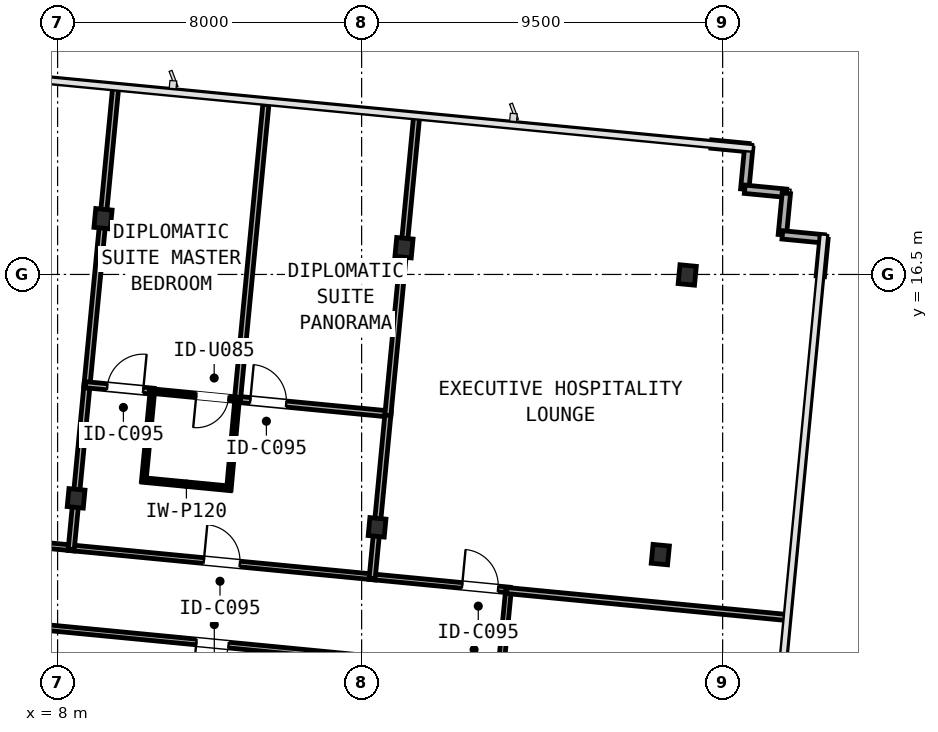
"""IFC4 building model, lengths in metres.
Left out: names, types, materials, properties, quantities, classifications, styles, units other than length and angle.
Written with IfcOpenShell. Run it as: python <this file> out.ifc"""

import sys

from ifc_helpers import new_model, si_unit, direction, frame, frame_2d, origin, origin_2d, place, context, subcontext, project, spatial, rectangle, i_section, extrude, element, fill, save


model = new_model("IFC4")
c1 = context("Model", 3, precision=1e-05, world=origin(), true_north=direction((0.0, 1.0)))
c2 = subcontext(c1, "Body", "Model", "MODEL_VIEW")
j1 = project(units=[si_unit("LENGTHUNIT", "METRE"), si_unit("PLANEANGLEUNIT", "RADIAN")], contexts=[c1])
p1 = place(None, origin())
s1 = spatial("IfcSite", under=j1, at=p1, CompositionType="ELEMENT")
p2 = place(p1, origin())
s2 = spatial("IfcBuilding", under=s1, at=p2, CompositionType="ELEMENT")
p3 = place(p2, frame((0.0, 0.0, 166.95)))
s3 = spatial("IfcBuildingStorey", under=s2, at=p3, CompositionType="ELEMENT", Elevation=166.95)
p4 = place(p3, frame((8.487, 10.609, 0.0), z_axis=(0.0, 0.0, 1.0), x_axis=(0.995396198367, -0.09584575252, 0.0)))
e1 = element("IfcColumn", 1, at=p4, inside=s3, PredefinedType="COLUMN", context=c2, shape_type="SweptSolid", body=[
    extrude(i_section(OverallWidth=0.424, OverallDepth=0.474, WebThickness=0.048, FlangeThickness=0.077, FilletRadius=0.031, at=origin_2d()), origin(), (0.0, 0.0, 1.0), 3.45),
])
p5 = place(p3, frame((9.195, 17.967, 0.0), z_axis=(0.0, 0.0, 1.0), x_axis=(0.995396198367, -0.09584575252, 0.0)))
e2 = element("IfcColumn", 2, at=p5, inside=s3, PredefinedType="COLUMN", context=c2, shape_type="SweptSolid", body=[
    extrude(i_section(OverallWidth=0.432, OverallDepth=0.498, WebThickness=0.056, FlangeThickness=0.089, FilletRadius=0.031, at=origin_2d()), origin(), (0.0, 0.0, 1.0), 3.45),
])
p6 = place(p3, frame((16.406, 9.846, 0.0), z_axis=(0.0, 0.0, 1.0), x_axis=(0.995396198367, -0.09584575252, 0.0)))
e3 = element("IfcColumn", 3, at=p6, inside=s3, PredefinedType="COLUMN", context=c2, shape_type="SweptSolid", body=[
    extrude(i_section(OverallWidth=0.424, OverallDepth=0.474, WebThickness=0.048, FlangeThickness=0.077, FilletRadius=0.031, at=origin_2d()), origin(), (0.0, 0.0, 1.0), 3.45),
])
for number, where, z_axis, x_axis in (
    (4, (17.115, 17.204, 0.0), (0.0, 0.0, 1.0), (0.995, -0.096, 0.0)),
    (5, (23.86, 9.128, 0.0), (0.0, 0.0, 1.0), (0.995, -0.096, 0.0)),
    (6, (24.568, 16.486, 0.0), (0.0, 0.0, 1.0), (0.995, -0.096, 0.0)),
):
    element("IfcColumn", number, at=place(p3, frame(where, z_axis=z_axis, x_axis=x_axis)), inside=s3, PredefinedType="COLUMN", context=c2, shape_type="SweptSolid", body=[
        extrude(i_section(OverallWidth=0.432, OverallDepth=0.498, WebThickness=0.056, FlangeThickness=0.089, FilletRadius=0.031, at=origin_2d()), origin(), (0.0, 0.0, 1.0), 3.45),
    ])
p7 = place(p3, frame((25.201, 19.931, 0.0), z_axis=(0.0, 0.0, 1.0), x_axis=(0.99541083642, -0.095693608655, 0.0)))
e7 = element("IfcWall", 7, at=p7, inside=s3, PredefinedType="STANDARD", context=c2, shape_type="SweptSolid", body=[
    extrude(rectangle(XDim=0.99, YDim=0.22, at=frame_2d((0.495, 0.0))), origin(), (0.0, 0.0, 1.0), 3.19),
])
p8 = place(p3, frame((26.187, 19.837, 0.0), z_axis=(0.0, 0.0, 1.0), x_axis=(-0.095657429048, -0.995414313875, 0.0)))
e8 = element("IfcWall", 8, at=p8, inside=s3, PredefinedType="STANDARD", context=c2, shape_type="SweptSolid", body=[
    extrude(rectangle(XDim=1.1, YDim=0.22, at=frame_2d((0.55, 0.0))), origin(), (0.0, 0.0, 1.0), 3.19),
])
p9 = place(p3, frame((26.082, 18.742, 0.0), z_axis=(0.0, 0.0, 1.0), x_axis=(0.995391116058, -0.095898519656, 0.0)))
e9 = element("IfcWall", 9, at=p9, inside=s3, PredefinedType="STANDARD", context=c2, shape_type="SweptSolid", body=[
    extrude(rectangle(XDim=1.1, YDim=0.22, at=frame_2d((0.55, 0.0))), origin(), (0.0, 0.0, 1.0), 3.19),
])
p10 = place(p3, frame((27.176, 18.636, 0.0), z_axis=(0.0, 0.0, 1.0), x_axis=(-0.095657429048, -0.995414313875, 0.0)))
e10 = element("IfcWall", 10, at=p10, inside=s3, PredefinedType="STANDARD", context=c2, shape_type="SweptSolid", body=[
    extrude(rectangle(XDim=1.1, YDim=0.22, at=frame_2d((0.55, 0.0))), origin(), (0.0, 0.0, 1.0), 3.19),
])
p11 = place(p3, frame((27.071, 17.541, 0.0), z_axis=(0.0, 0.0, 1.0), x_axis=(0.995391116058, -0.095898519656, 0.0)))
e11 = element("IfcWall", 11, at=p11, inside=s3, PredefinedType="STANDARD", context=c2, shape_type="SweptSolid", body=[
    extrude(rectangle(XDim=1.1, YDim=0.22, at=frame_2d((0.55, 0.0))), origin(), (0.0, 0.0, 1.0), 3.19),
])
p12 = place(p3, frame((28.166, 17.436, 0.0), z_axis=(0.0, 0.0, 1.0), x_axis=(-0.095693608655, -0.99541083642, 0.0)))
e12 = element("IfcWall", 12, at=p12, inside=s3, PredefinedType="STANDARD", context=c2, shape_type="SweptSolid", body=[
    extrude(rectangle(XDim=0.99, YDim=0.22, at=frame_2d((0.495, 0.0))), origin(), (0.0, 0.0, 1.0), 3.19),
])
p13 = place(p3, frame((-7.559, 10.84, 0.0), z_axis=(0.0, 0.0, 1.0), x_axis=(0.995396443768, -0.095843203903, 0.0)))
e13 = element("IfcWall", 13, at=p13, inside=s3, PredefinedType="PARTITIONING", context=c2, shape_type="SweptSolid", body=[
    extrude(rectangle(XDim=16.076, YDim=0.15, at=frame_2d((8.038, 0.0))), origin(), (0.0, 0.0, 1.0), 2.479),
])
p14 = place(p13, frame((3.532, 0.0, 0.0)))
e14 = element("IfcOpeningElement", 14, at=p14, cuts=e13, PredefinedType="OPENING", context=c2, shape_type="SweptSolid", body=[
    extrude(rectangle(XDim=0.95, YDim=2.15, at=frame_2d((0.475, 1.075))), frame((0.0, 0.085, 0.0), z_axis=(0.0, -1.0, 0.0), x_axis=(1.0, 0.0, 0.0)), (0.0, 0.0, 1.0), 0.17),
])
p15 = place(p3, frame((8.28, 9.314, 0.0), z_axis=(0.0, 0.0, 1.0), x_axis=(0.995395467524, -0.095853342309, 0.0)))
e15 = element("IfcWall", 15, at=p15, inside=s3, PredefinedType="PARTITIONING", context=c2, shape_type="SweptSolid", body=[
    extrude(rectangle(XDim=8.12, YDim=0.15, at=frame_2d((4.06, 0.0))), origin(), (0.0, 0.0, 1.0), 2.479),
])
p16 = place(p15, frame((3.585, 0.0, 0.0)))
e16 = element("IfcOpeningElement", 16, at=p16, cuts=e15, PredefinedType="OPENING", context=c2, shape_type="SweptSolid", body=[
    extrude(rectangle(XDim=0.95, YDim=2.15, at=frame_2d((0.475, 1.075))), frame((0.0, 0.085, 0.0), z_axis=(0.0, -1.0, 0.0), x_axis=(1.0, 0.0, 0.0)), (0.0, 0.0, 1.0), 0.17),
])
p17 = place(p3, frame((16.199, 8.552, 0.0), z_axis=(0.0, 0.0, 1.0), x_axis=(0.995391104887, -0.095898635608, 0.0)))
e17 = element("IfcWall", 17, at=p17, inside=s3, PredefinedType="PARTITIONING", context=c2, shape_type="SweptSolid", body=[
    extrude(rectangle(XDim=3.722, YDim=0.15, at=frame_2d((1.861, 0.0))), origin(), (0.0, 0.0, 1.0), 2.479),
])
p18 = place(p17, frame((2.457, 0.0, 0.0)))
e18 = element("IfcOpeningElement", 18, at=p18, cuts=e17, PredefinedType="OPENING", context=c2, shape_type="SweptSolid", body=[
    extrude(rectangle(XDim=0.95, YDim=2.15, at=frame_2d((0.475, 1.075))), frame((0.0, 0.085, 0.0), z_axis=(0.0, -1.0, 0.0), x_axis=(1.0, 0.0, 0.0)), (0.0, 0.0, 1.0), 0.17),
])
p19 = place(p3, frame((16.156, 6.396, 0.0), z_axis=(0.0, 0.0, 1.0), x_axis=(-0.99539478422, 0.095860437863, 0.0)))
e19 = element("IfcWall", 19, at=p19, inside=s3, PredefinedType="PARTITIONING", context=c2, shape_type="SweptSolid", body=[
    extrude(rectangle(XDim=10.936, YDim=0.15, at=frame_2d((5.468, 0.0))), origin(), (0.0, 0.0, 1.0), 2.479),
])
p20 = place(p19, frame((3.675, 0.0, 0.0)))
e20 = element("IfcOpeningElement", 20, at=p20, cuts=e19, PredefinedType="OPENING", context=c2, shape_type="SweptSolid", body=[
    extrude(rectangle(XDim=0.85, YDim=2.05, at=frame_2d((0.425, 1.025))), frame((0.0, 0.085, 0.0), z_axis=(0.0, -1.0, 0.0), x_axis=(1.0, 0.0, 0.0)), (0.0, 0.0, 1.0), 0.17),
])
p21 = place(p3, frame((19.866, 8.219, 0.0), z_axis=(0.0, 0.0, 1.0), x_axis=(-0.095773447772, -0.995403157872, 0.0)))
e21 = element("IfcWall", 21, at=p21, inside=s3, PredefinedType="PARTITIONING", context=c2, shape_type="SweptSolid", body=[
    extrude(rectangle(XDim=2.21, YDim=0.15, at=frame_2d((1.105, 0.0))), origin(), (0.0, 0.0, 1.0), 2.718),
])
p22 = place(p3, frame((8.47, 10.433, 0.0), z_axis=(0.0, 0.0, 1.0), x_axis=(-0.095831494917, -0.995397571115, 0.0)))
e22 = element("IfcWall", 22, at=p22, inside=s3, PredefinedType="PARTITIONING", context=c2, shape_type="SweptSolid", body=[
    extrude(rectangle(XDim=1.172, YDim=0.16, at=frame_2d((0.586, 0.0))), origin(), (0.0, 0.0, 1.0), 2.479),
])
p23 = place(p3, frame((8.782, 13.677, 0.0), z_axis=(0.0, 0.0, 1.0), x_axis=(-0.095851667856, -0.995395628767, 0.0)))
e23 = element("IfcWall", 23, at=p23, inside=s3, PredefinedType="PARTITIONING", context=c2, shape_type="SweptSolid", body=[
    extrude(rectangle(XDim=2.906, YDim=0.16, at=frame_2d((1.453, 0.0))), origin(), (0.0, 0.0, 1.0), 2.479),
])
p24 = place(p3, frame((9.178, 17.791, 0.0), z_axis=(0.0, 0.0, 1.0), x_axis=(-0.095830387623, -0.995397677719, 0.0)))
e24 = element("IfcWall", 24, at=p24, inside=s3, PredefinedType="PARTITIONING", context=c2, shape_type="SweptSolid", body=[
    extrude(rectangle(XDim=4.298, YDim=0.16, at=frame_2d((2.149, 0.0))), origin(), (0.0, 0.0, 1.0), 2.479),
])
p25 = place(p3, frame((9.533, 21.47, 0.0), z_axis=(0.0, 0.0, 1.0), x_axis=(-0.095859866796, -0.995394839216, 0.0)))
e25 = element("IfcWall", 25, at=p25, inside=s3, PredefinedType="PARTITIONING", context=c2, shape_type="SweptSolid", body=[
    extrude(rectangle(XDim=3.344, YDim=0.16, at=frame_2d((1.672, 0.0))), origin(), (0.0, 0.0, 1.0), 3.19),
])
p26 = place(p3, frame((8.735, 13.599, 0.0), z_axis=(0.0, 0.0, 1.0), x_axis=(0.995394173932, -0.095866774755, 0.0)))
e26 = element("IfcWall", 26, at=p26, inside=s3, PredefinedType="PARTITIONING", context=c2, shape_type="SweptSolid", body=[
    extrude(rectangle(XDim=1.808, YDim=0.16, at=frame_2d((0.904, 0.0))), origin(), (0.0, 0.0, 1.0), 2.479),
])
p27 = place(p26, frame((0.574, 0.0, 0.0)))
e27 = element("IfcOpeningElement", 27, at=p27, cuts=e26, PredefinedType="OPENING", context=c2, shape_type="SweptSolid", body=[
    extrude(rectangle(XDim=0.95, YDim=2.15, at=frame_2d((0.475, 1.075))), frame((0.0, 0.09, 0.0), z_axis=(0.0, -1.0, 0.0), x_axis=(1.0, 0.0, 0.0)), (0.0, 0.0, 1.0), 0.18),
])
p28 = place(p3, frame((12.684, 13.218, 0.0), z_axis=(0.0, 0.0, 1.0), x_axis=(0.995396485523, -0.095842770251, 0.0)))
e28 = element("IfcWall", 28, at=p28, inside=s3, PredefinedType="PARTITIONING", context=c2, shape_type="SweptSolid", body=[
    extrude(rectangle(XDim=4.068, YDim=0.16, at=frame_2d((2.034, 0.0))), origin(), (0.0, 0.0, 1.0), 2.479),
])
p29 = place(p28, frame((0.386, 0.0, 0.0)))
e29 = element("IfcOpeningElement", 29, at=p29, cuts=e28, PredefinedType="OPENING", context=c2, shape_type="SweptSolid", body=[
    extrude(rectangle(XDim=0.95, YDim=2.15, at=frame_2d((0.475, 1.075))), frame((0.0, 0.09, 0.0), z_axis=(0.0, -1.0, 0.0), x_axis=(1.0, 0.0, 0.0)), (0.0, 0.0, 1.0), 0.18),
])
p30 = place(p3, frame((10.498, 13.469, 0.0), z_axis=(0.0, 0.0, 1.0), x_axis=(-0.095842578202, -0.995396504014, 0.0)))
e30 = element("IfcWall", 30, at=p30, inside=s3, PredefinedType="PARTITIONING", context=c2, shape_type="SweptSolid", body=[
    extrude(rectangle(XDim=2.43, YDim=0.12, at=frame_2d((1.215, 0.0))), origin(), (0.0, 0.0, 1.0), 3.19),
])
p31 = place(p3, frame((10.229, 11.094, 0.0), z_axis=(0.0, 0.0, 1.0), x_axis=(0.995403652262, -0.095768309281, 0.0)))
e31 = element("IfcWall", 31, at=p31, inside=s3, PredefinedType="PARTITIONING", context=c2, shape_type="SweptSolid", body=[
    extrude(rectangle(XDim=2.33, YDim=0.12, at=frame_2d((1.165, 0.0))), origin(), (0.0, 0.0, 1.0), 2.718),
])
p32 = place(p3, frame((12.505, 10.834, 0.0), z_axis=(0.0, 0.0, 1.0), x_axis=(0.091622673793, 0.995793796751, 0.0)))
e32 = element("IfcWall", 32, at=p32, inside=s3, PredefinedType="PARTITIONING", context=c2, shape_type="SweptSolid", body=[
    extrude(rectangle(XDim=2.43, YDim=0.12, at=frame_2d((1.215, 0.0))), origin(), (0.0, 0.0, 1.0), 2.718),
])
p33 = place(p3, frame((16.389, 9.671, 0.0), z_axis=(0.0, 0.0, 1.0), x_axis=(-0.095811626391, -0.995399483749, 0.0)))
e33 = element("IfcWall", 33, at=p33, inside=s3, PredefinedType="PARTITIONING", context=c2, shape_type="SweptSolid", body=[
    extrude(rectangle(XDim=1.172, YDim=0.16, at=frame_2d((0.586, 0.0))), origin(), (0.0, 0.0, 1.0), 2.479),
])
p34 = place(p3, frame((16.698, 12.872, 0.0), z_axis=(0.0, 0.0, 1.0), x_axis=(-0.095899197745, -0.995391050729, 0.0)))
e34 = element("IfcWall", 34, at=p34, inside=s3, PredefinedType="PARTITIONING", context=c2, shape_type="SweptSolid", body=[
    extrude(rectangle(XDim=2.864, YDim=0.16, at=frame_2d((1.432, 0.0))), origin(), (0.0, 0.0, 1.0), 2.479),
])
p35 = place(p3, frame((13.481, 20.97, 0.0), z_axis=(0.0, 0.0, 1.0), x_axis=(-0.095851985855, -0.995395598146, 0.0)))
e35 = element("IfcWall", 35, at=p35, inside=s3, PredefinedType="PARTITIONING", context=c2, shape_type="SweptSolid", body=[
    extrude(rectangle(XDim=7.832, YDim=0.16, at=frame_2d((3.916, 0.0))), origin(), (0.0, 0.0, 1.0), 2.558),
])
p36 = place(p3, frame((12.774, 13.21, 0.0), z_axis=(0.0, 0.0, 1.0), x_axis=(-0.995398273854, 0.095824195322, 0.0)))
e36 = element("IfcWall", 36, at=p36, inside=s3, PredefinedType="PARTITIONING", context=c2, shape_type="SweptSolid", body=[
    extrude(rectangle(XDim=2.372, YDim=0.12, at=frame_2d((1.186, 0.0))), origin(), (0.0, 0.0, 1.0), 2.718),
])
p37 = place(p36, frame((0.28, 0.0, 0.0)))
e37 = element("IfcOpeningElement", 37, at=p37, cuts=e36, PredefinedType="OPENING", context=c2, shape_type="SweptSolid", body=[
    extrude(rectangle(XDim=0.85, YDim=2.1, at=frame_2d((0.425, 1.05))), frame((0.0, 0.07, 0.0), z_axis=(0.0, -1.0, 0.0), x_axis=(1.0, 0.0, 0.0)), (0.0, 0.0, 1.0), 0.14),
])
p38 = place(p3, frame((17.098, 17.029, 0.0), z_axis=(0.0, 0.0, 1.0), x_axis=(-0.095856690152, -0.995395145132, 0.0)))
e38 = element("IfcWall", 38, at=p38, inside=s3, PredefinedType="PARTITIONING", context=c2, shape_type="SweptSolid", body=[
    extrude(rectangle(XDim=4.256, YDim=0.16, at=frame_2d((2.128, 0.0))), origin(), (0.0, 0.0, 1.0), 2.479),
])
p39 = place(p3, frame((17.452, 20.708, 0.0), z_axis=(0.0, 0.0, 1.0), x_axis=(-0.095859866796, -0.995394839216, 0.0)))
e39 = element("IfcWall", 39, at=p39, inside=s3, PredefinedType="PARTITIONING", context=c2, shape_type="SweptSolid", body=[
    extrude(rectangle(XDim=3.344, YDim=0.16, at=frame_2d((1.672, 0.0))), origin(), (0.0, 0.0, 1.0), 3.19),
])
p40 = place(p3, frame((27.236, 7.469, 0.0), z_axis=(0.0, 0.0, 1.0), x_axis=(-0.995396228159, 0.095845443117, 0.0)))
e40 = element("IfcWall", 40, at=p40, inside=s3, PredefinedType="PARTITIONING", context=c2, shape_type="SweptSolid", body=[
    extrude(rectangle(XDim=7.448, YDim=0.16, at=frame_2d((3.724, 0.0))), origin(), (0.0, 0.0, 1.0), 2.558),
])
p41 = place(p16, frame((0.95, 0.0, 0.0), z_axis=(0.0, 0.0, 1.0), x_axis=(-1.0, 0.0, 0.0)))
e41 = element("IfcDoor", 41, at=p41, inside=s3, OperationType="SINGLE_SWING_LEFT", PredefinedType="DOOR", context=c2, shape_type="SweptSolid", body=[
    extrude(rectangle(XDim=0.95, YDim=2.15, at=frame_2d((0.475, 1.075))), frame((0.0, 0.025, 0.0), z_axis=(0.0, -1.0, 0.0), x_axis=(1.0, 0.0, 0.0)), (0.0, 0.0, 1.0), 0.05),
])
fill(e16, e41)
p42 = place(p27, origin())
e42 = element("IfcDoor", 42, at=p42, inside=s3, OperationType="SINGLE_SWING_RIGHT", PredefinedType="DOOR", context=c2, shape_type="SweptSolid", body=[
    extrude(rectangle(XDim=0.95, YDim=2.15, at=frame_2d((0.475, 1.075))), frame((0.0, 0.025, 0.0), z_axis=(0.0, -1.0, 0.0), x_axis=(1.0, 0.0, 0.0)), (0.0, 0.0, 1.0), 0.05),
])
fill(e27, e42)
p43 = place(p29, origin())
e43 = element("IfcDoor", 43, at=p43, inside=s3, OperationType="SINGLE_SWING_LEFT", PredefinedType="DOOR", context=c2, shape_type="SweptSolid", body=[
    extrude(rectangle(XDim=0.95, YDim=2.15, at=frame_2d((0.475, 1.075))), frame((0.0, 0.025, 0.0), z_axis=(0.0, -1.0, 0.0), x_axis=(1.0, 0.0, 0.0)), (0.0, 0.0, 1.0), 0.05),
])
fill(e29, e43)
p44 = place(p37, frame((0.85, 0.0, 0.0), z_axis=(0.0, 0.0, 1.0), x_axis=(-1.0, 0.0, 0.0)))
e44 = element("IfcDoor", 44, at=p44, inside=s3, OperationType="SINGLE_SWING_RIGHT", PredefinedType="DOOR", context=c2, shape_type="SweptSolid", body=[
    extrude(rectangle(XDim=0.85, YDim=2.1, at=frame_2d((0.425, 1.05))), frame((0.0, 0.025, 0.0), z_axis=(0.0, -1.0, 0.0), x_axis=(1.0, 0.0, 0.0)), (0.0, 0.0, 1.0), 0.05),
])
fill(e37, e44)
p45 = place(p18, frame((0.95, 0.0, 0.0), z_axis=(0.0, 0.0, 1.0), x_axis=(-1.0, 0.0, 0.0)))
e45 = element("IfcDoor", 45, at=p45, inside=s3, OperationType="SINGLE_SWING_LEFT", PredefinedType="DOOR", context=c2, shape_type="SweptSolid", body=[
    extrude(rectangle(XDim=0.95, YDim=2.15, at=frame_2d((0.475, 1.075))), frame((0.0, 0.025, 0.0), z_axis=(0.0, -1.0, 0.0), x_axis=(1.0, 0.0, 0.0)), (0.0, 0.0, 1.0), 0.05),
])
fill(e18, e45)
p46 = place(p20, frame((0.85, 0.0, 0.0), z_axis=(0.0, 0.0, 1.0), x_axis=(-1.0, 0.0, 0.0)))
e46 = element("IfcDoor", 46, at=p46, inside=s3, OperationType="SINGLE_SWING_RIGHT", PredefinedType="DOOR", context=c2, shape_type="SweptSolid", body=[
    extrude(rectangle(XDim=0.85, YDim=2.05, at=frame_2d((0.425, 1.025))), frame((0.0, 0.025, 0.0), z_axis=(0.0, -1.0, 0.0), x_axis=(1.0, 0.0, 0.0)), (0.0, 0.0, 1.0), 0.05),
])
fill(e20, e46)
save(model, sys.argv[1])
